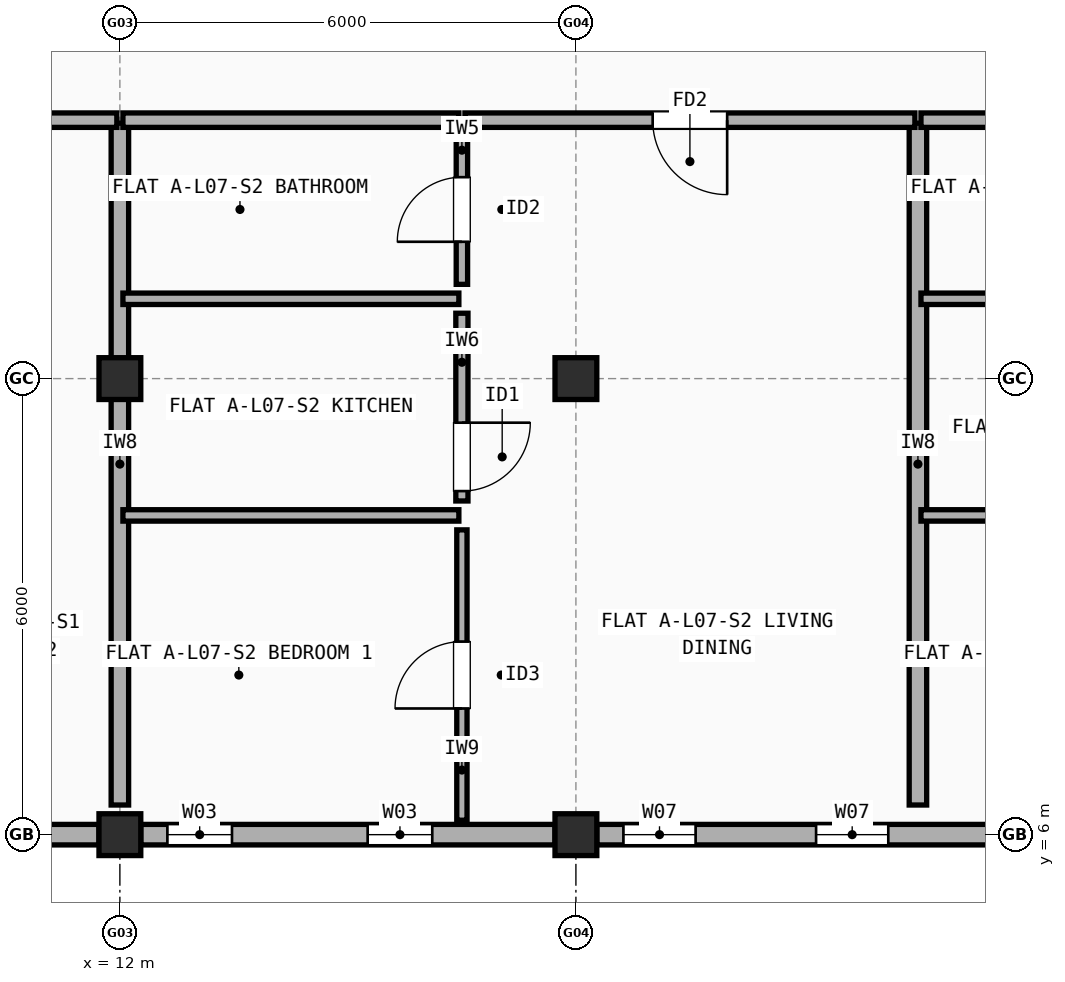
"""IFC4 building model, lengths in metres.
Left out: names, types, materials, properties, quantities, classifications, styles, units other than length and angle.
Written with IfcOpenShell. Run it as: python <this file> out.ifc"""

import sys

from ifc_helpers import new_model, si_unit, direction, frame, frame_2d, origin, origin_2d, place, context, subcontext, project, spatial, rectangle, extrude, element, fill, save


model = new_model("IFC4")
c1 = context("Model", 3, precision=1e-05, world=origin(), true_north=direction((0.0, 1.0)))
c2 = subcontext(c1, "Body", "Model", "MODEL_VIEW")
j1 = project(units=[si_unit("LENGTHUNIT", "METRE"), si_unit("PLANEANGLEUNIT", "RADIAN")], contexts=[c1])
p1 = place(None, origin())
s1 = spatial("IfcSite", under=j1, at=p1, CompositionType="ELEMENT")
p2 = place(p1, origin())
s2 = spatial("IfcBuilding", under=s1, at=p2, CompositionType="ELEMENT")
p3 = place(p2, frame((0.0, 0.0, 23.7)))
s3 = spatial("IfcBuildingStorey", under=s2, at=p3, CompositionType="ELEMENT", Elevation=23.7)
for number, where, z_axis, x_axis in (
    (1, (12.0, 6.0, 0.0), (0.0, 0.0, 1.0), (1.0, 0.0, 0.0)),
    (2, (12.0, 12.0, 0.0), (0.0, 0.0, 1.0), (1.0, 0.0, 0.0)),
    (3, (18.0, 6.0, 0.0), (0.0, 0.0, 1.0), (1.0, 0.0, 0.0)),
    (4, (18.0, 12.0, 0.0), (0.0, 0.0, 1.0), (1.0, 0.0, 0.0)),
):
    element("IfcColumn", number, at=place(p3, frame(where, z_axis=z_axis, x_axis=x_axis)), inside=s3, PredefinedType="COLUMN", context=c2, shape_type="SweptSolid", body=[
        extrude(rectangle(XDim=0.55, YDim=0.55, at=origin_2d()), origin(), (0.0, 0.0, 1.0), 2.975),
    ])
p4 = place(p3, frame((6.275, 6.0, 0.0), z_axis=(0.0, 0.0, 1.0), x_axis=(1.0, 0.0, 0.0)))
e5 = element("IfcWall", 5, at=p4, inside=s3, PredefinedType="STANDARD", context=c2, shape_type="SweptSolid", body=[
    extrude(rectangle(XDim=5.45, YDim=0.27, at=frame_2d((2.725, 0.0))), origin(), (0.0, 0.0, 1.0), 2.457),
])
p5 = place(p4, frame((0.742, 0.0, 0.9)))
e6 = element("IfcOpeningElement", 6, at=p5, cuts=e5, PredefinedType="OPENING", context=c2, shape_type="SweptSolid", body=[
    extrude(rectangle(XDim=1.2, YDim=1.35, at=frame_2d((0.6, 0.675))), frame((0.0, 0.145, 0.0), z_axis=(0.0, -1.0, 0.0), x_axis=(1.0, 0.0, 0.0)), (0.0, 0.0, 1.0), 0.29),
])
p6 = place(p4, frame((3.708, 0.0, 0.9)))
e7 = element("IfcOpeningElement", 7, at=p6, cuts=e5, PredefinedType="OPENING", context=c2, shape_type="SweptSolid", body=[
    extrude(rectangle(XDim=0.8, YDim=1.2, at=frame_2d((0.4, 0.6))), frame((0.0, 0.145, 0.0), z_axis=(0.0, -1.0, 0.0), x_axis=(1.0, 0.0, 0.0)), (0.0, 0.0, 1.0), 0.29),
])
p7 = place(p3, frame((12.275, 6.0, 0.0), z_axis=(0.0, 0.0, 1.0), x_axis=(1.0, 0.0, 0.0)))
e8 = element("IfcWall", 8, at=p7, inside=s3, PredefinedType="STANDARD", context=c2, shape_type="SweptSolid", body=[
    extrude(rectangle(XDim=5.45, YDim=0.27, at=frame_2d((2.725, 0.0))), origin(), (0.0, 0.0, 1.0), 2.457),
])
p8 = place(p7, frame((0.35, 0.0, 0.9)))
e9 = element("IfcOpeningElement", 9, at=p8, cuts=e8, PredefinedType="OPENING", context=c2, shape_type="SweptSolid", body=[
    extrude(rectangle(XDim=0.85, YDim=1.25, at=frame_2d((0.425, 0.625))), frame((0.0, 0.145, 0.0), z_axis=(0.0, -1.0, 0.0), x_axis=(1.0, 0.0, 0.0)), (0.0, 0.0, 1.0), 0.29),
])
p9 = place(p7, frame((2.985, 0.0, 0.9)))
e10 = element("IfcOpeningElement", 10, at=p9, cuts=e8, PredefinedType="OPENING", context=c2, shape_type="SweptSolid", body=[
    extrude(rectangle(XDim=0.85, YDim=1.25, at=frame_2d((0.425, 0.625))), frame((0.0, 0.145, 0.0), z_axis=(0.0, -1.0, 0.0), x_axis=(1.0, 0.0, 0.0)), (0.0, 0.0, 1.0), 0.29),
])
p10 = place(p3, frame((18.275, 6.0, 0.0), z_axis=(0.0, 0.0, 1.0), x_axis=(1.0, 0.0, 0.0)))
e11 = element("IfcWall", 11, at=p10, inside=s3, PredefinedType="STANDARD", context=c2, shape_type="SweptSolid", body=[
    extrude(rectangle(XDim=5.45, YDim=0.27, at=frame_2d((2.725, 0.0))), origin(), (0.0, 0.0, 1.0), 2.457),
])
p11 = place(p10, frame((0.35, 0.0, 0.9)))
e12 = element("IfcOpeningElement", 12, at=p11, cuts=e11, PredefinedType="OPENING", context=c2, shape_type="SweptSolid", body=[
    extrude(rectangle(XDim=0.95, YDim=1.35, at=frame_2d((0.475, 0.675))), frame((0.0, 0.145, 0.0), z_axis=(0.0, -1.0, 0.0), x_axis=(1.0, 0.0, 0.0)), (0.0, 0.0, 1.0), 0.29),
])
p12 = place(p10, frame((2.885, 0.0, 0.9)))
e13 = element("IfcOpeningElement", 13, at=p12, cuts=e11, PredefinedType="OPENING", context=c2, shape_type="SweptSolid", body=[
    extrude(rectangle(XDim=0.95, YDim=1.35, at=frame_2d((0.475, 0.675))), frame((0.0, 0.145, 0.0), z_axis=(0.0, -1.0, 0.0), x_axis=(1.0, 0.0, 0.0)), (0.0, 0.0, 1.0), 0.29),
])
p13 = place(p3, frame((12.0, 6.39, 0.0), z_axis=(0.0, 0.0, 1.0), x_axis=(0.0, 1.0, 0.0)))
e14 = element("IfcWall", 14, at=p13, inside=s3, PredefinedType="SOLIDWALL", context=c2, shape_type="SweptSolid", body=[
    extrude(rectangle(XDim=8.97, YDim=0.23, at=frame_2d((4.485, 0.0))), origin(), (0.0, 0.0, 1.0), 2.458),
])
p14 = place(p3, frame((9.04, 15.4, 0.0), z_axis=(0.0, 0.0, 1.0), x_axis=(1.0, 0.0, 0.0)))
e15 = element("IfcWall", 15, at=p14, inside=s3, PredefinedType="SOLIDWALL", context=c2, shape_type="SweptSolid", body=[
    extrude(rectangle(XDim=2.92, YDim=0.19, at=frame_2d((1.46, 0.0))), origin(), (0.0, 0.0, 1.0), 2.458),
])
p15 = place(p3, frame((22.5, 6.39, 0.0), z_axis=(0.0, 0.0, 1.0), x_axis=(0.0, 1.0, 0.0)))
e16 = element("IfcWall", 16, at=p15, inside=s3, PredefinedType="SOLIDWALL", context=c2, shape_type="SweptSolid", body=[
    extrude(rectangle(XDim=8.97, YDim=0.23, at=frame_2d((4.485, 0.0))), origin(), (0.0, 0.0, 1.0), 2.408),
])
p16 = place(p3, frame((12.04, 15.4, 0.0), z_axis=(0.0, 0.0, 1.0), x_axis=(1.0, 0.0, 0.0)))
e17 = element("IfcWall", 17, at=p16, inside=s3, PredefinedType="SOLIDWALL", context=c2, shape_type="SweptSolid", body=[
    extrude(rectangle(XDim=4.42, YDim=0.19, at=frame_2d((2.21, 0.0))), origin(), (0.0, 0.0, 1.0), 2.458),
])
p17 = place(p3, frame((16.54, 15.4, 0.0), z_axis=(0.0, 0.0, 1.0), x_axis=(1.0, 0.0, 0.0)))
e18 = element("IfcWall", 18, at=p17, inside=s3, PredefinedType="SOLIDWALL", context=c2, shape_type="SweptSolid", body=[
    extrude(rectangle(XDim=5.92, YDim=0.19, at=frame_2d((2.96, 0.0))), origin(), (0.0, 0.0, 1.0), 2.548),
])
p18 = place(p17, frame((2.47, 0.0, 0.0)))
e19 = element("IfcOpeningElement", 19, at=p18, cuts=e18, PredefinedType="OPENING", context=c2, shape_type="SweptSolid", body=[
    extrude(rectangle(XDim=0.98, YDim=2.15, at=frame_2d((0.49, 1.075))), frame((0.0, 0.105, 0.0), z_axis=(0.0, -1.0, 0.0), x_axis=(1.0, 0.0, 0.0)), (0.0, 0.0, 1.0), 0.21),
])
p19 = place(p3, frame((16.5, 6.19, 0.0), z_axis=(0.0, 0.0, 1.0), x_axis=(0.0, 1.0, 0.0)))
e20 = element("IfcWall", 20, at=p19, inside=s3, PredefinedType="PARTITIONING", context=c2, shape_type="SweptSolid", body=[
    extrude(rectangle(XDim=3.82, YDim=0.135, at=frame_2d((1.91, 0.0))), origin(), (0.0, 0.0, 1.0), 2.975),
])
p20 = place(p19, frame((1.47, 0.0, 0.0)))
e21 = element("IfcOpeningElement", 21, at=p20, cuts=e20, PredefinedType="OPENING", context=c2, shape_type="SweptSolid", body=[
    extrude(rectangle(XDim=0.88, YDim=2.1, at=frame_2d((0.44, 1.05))), frame((0.0, 0.077, 0.0), z_axis=(0.0, -1.0, 0.0), x_axis=(1.0, 0.0, 0.0)), (0.0, 0.0, 1.0), 0.155),
])
p21 = place(p3, frame((16.5, 10.39, 0.0), z_axis=(0.0, 0.0, 1.0), x_axis=(0.0, 1.0, 0.0)))
e22 = element("IfcWall", 22, at=p21, inside=s3, PredefinedType="PLUMBINGWALL", context=c2, shape_type="SweptSolid", body=[
    extrude(rectangle(XDim=2.47, YDim=0.16, at=frame_2d((1.235, 0.0))), origin(), (0.0, 0.0, 1.0), 2.508),
])
p22 = place(p21, frame((0.13, 0.0, 0.0)))
e23 = element("IfcOpeningElement", 23, at=p22, cuts=e22, PredefinedType="OPENING", context=c2, shape_type="SweptSolid", body=[
    extrude(rectangle(XDim=0.9, YDim=2.1, at=frame_2d((0.45, 1.05))), frame((0.0, 0.09, 0.0), z_axis=(0.0, -1.0, 0.0), x_axis=(1.0, 0.0, 0.0)), (0.0, 0.0, 1.0), 0.18),
])
p23 = place(p3, frame((16.5, 13.24, 0.0), z_axis=(0.0, 0.0, 1.0), x_axis=(0.0, 1.0, 0.0)))
e24 = element("IfcWall", 24, at=p23, inside=s3, PredefinedType="PARTITIONING", context=c2, shape_type="SweptSolid", body=[
    extrude(rectangle(XDim=1.97, YDim=0.15, at=frame_2d((0.985, 0.0))), origin(), (0.0, 0.0, 1.0), 2.975),
])
p24 = place(p23, frame((0.56, 0.0, 0.0)))
e25 = element("IfcOpeningElement", 25, at=p24, cuts=e24, PredefinedType="OPENING", context=c2, shape_type="SweptSolid", body=[
    extrude(rectangle(XDim=0.85, YDim=2.1, at=frame_2d((0.425, 1.05))), frame((0.0, 0.085, 0.0), z_axis=(0.0, -1.0, 0.0), x_axis=(1.0, 0.0, 0.0)), (0.0, 0.0, 1.0), 0.17),
])
p25 = place(p3, frame((12.04, 10.2, 0.0), z_axis=(0.0, 0.0, 1.0), x_axis=(1.0, 0.0, 0.0)))
e26 = element("IfcWall", 26, at=p25, inside=s3, PredefinedType="PARTITIONING", context=c2, shape_type="SweptSolid", body=[
    extrude(rectangle(XDim=4.42, YDim=0.15, at=frame_2d((2.21, 0.0))), origin(), (0.0, 0.0, 1.0), 2.508),
])
p26 = place(p3, frame((12.04, 13.05, 0.0), z_axis=(0.0, 0.0, 1.0), x_axis=(1.0, 0.0, 0.0)))
e27 = element("IfcWall", 27, at=p26, inside=s3, PredefinedType="PARTITIONING", context=c2, shape_type="SweptSolid", body=[
    extrude(rectangle(XDim=4.42, YDim=0.15, at=frame_2d((2.21, 0.0))), origin(), (0.0, 0.0, 1.0), 2.458),
])
p27 = place(p3, frame((22.54, 15.4, 0.0), z_axis=(0.0, 0.0, 1.0), x_axis=(1.0, 0.0, 0.0)))
e28 = element("IfcWall", 28, at=p27, inside=s3, PredefinedType="SOLIDWALL", context=c2, shape_type="SweptSolid", body=[
    extrude(rectangle(XDim=4.42, YDim=0.19, at=frame_2d((2.21, 0.0))), origin(), (0.0, 0.0, 1.0), 2.548),
])
p28 = place(p3, frame((22.54, 10.2, 0.0), z_axis=(0.0, 0.0, 1.0), x_axis=(1.0, 0.0, 0.0)))
e29 = element("IfcWall", 29, at=p28, inside=s3, PredefinedType="PARTITIONING", context=c2, shape_type="SweptSolid", body=[
    extrude(rectangle(XDim=4.42, YDim=0.15, at=frame_2d((2.21, 0.0))), origin(), (0.0, 0.0, 1.0), 2.458),
])
p29 = place(p3, frame((22.54, 13.05, 0.0), z_axis=(0.0, 0.0, 1.0), x_axis=(1.0, 0.0, 0.0)))
e30 = element("IfcWall", 30, at=p29, inside=s3, PredefinedType="PARTITIONING", context=c2, shape_type="SweptSolid", body=[
    extrude(rectangle(XDim=4.42, YDim=0.15, at=frame_2d((2.21, 0.0))), origin(), (0.0, 0.0, 1.0), 2.548),
])
p30 = place(p8, origin())
e31 = element("IfcWindow", 31, at=p30, inside=s3, PartitioningType="SINGLE_PANEL", PredefinedType="WINDOW", context=c2, shape_type="SweptSolid", body=[
    extrude(rectangle(XDim=0.85, YDim=1.25, at=frame_2d((0.425, 0.625))), frame((0.0, 0.03, 0.0), z_axis=(0.0, -1.0, 0.0), x_axis=(1.0, 0.0, 0.0)), (0.0, 0.0, 1.0), 0.06),
])
fill(e9, e31)
p31 = place(p9, origin())
e32 = element("IfcWindow", 32, at=p31, inside=s3, PartitioningType="SINGLE_PANEL", PredefinedType="WINDOW", context=c2, shape_type="SweptSolid", body=[
    extrude(rectangle(XDim=0.85, YDim=1.25, at=frame_2d((0.425, 0.625))), frame((0.0, 0.03, 0.0), z_axis=(0.0, -1.0, 0.0), x_axis=(1.0, 0.0, 0.0)), (0.0, 0.0, 1.0), 0.06),
])
fill(e10, e32)
p32 = place(p11, origin())
e33 = element("IfcWindow", 33, at=p32, inside=s3, PartitioningType="SINGLE_PANEL", PredefinedType="WINDOW", context=c2, shape_type="SweptSolid", body=[
    extrude(rectangle(XDim=0.95, YDim=1.35, at=frame_2d((0.475, 0.675))), frame((0.0, 0.03, 0.0), z_axis=(0.0, -1.0, 0.0), x_axis=(1.0, 0.0, 0.0)), (0.0, 0.0, 1.0), 0.06),
])
fill(e12, e33)
p33 = place(p12, origin())
e34 = element("IfcWindow", 34, at=p33, inside=s3, PartitioningType="SINGLE_PANEL", PredefinedType="WINDOW", context=c2, shape_type="SweptSolid", body=[
    extrude(rectangle(XDim=0.95, YDim=1.35, at=frame_2d((0.475, 0.675))), frame((0.0, 0.03, 0.0), z_axis=(0.0, -1.0, 0.0), x_axis=(1.0, 0.0, 0.0)), (0.0, 0.0, 1.0), 0.06),
])
fill(e13, e34)
p34 = place(p18, origin())
e35 = element("IfcDoor", 35, at=p34, inside=s3, OperationType="SINGLE_SWING_RIGHT", PredefinedType="DOOR", context=c2, shape_type="SweptSolid", body=[
    extrude(rectangle(XDim=0.98, YDim=2.15, at=frame_2d((0.49, 1.075))), frame((0.0, 0.025, 0.0), z_axis=(0.0, -1.0, 0.0), x_axis=(1.0, 0.0, 0.0)), (0.0, 0.0, 1.0), 0.05),
])
fill(e19, e35)
p35 = place(p20, origin())
e36 = element("IfcDoor", 36, at=p35, inside=s3, OperationType="SINGLE_SWING_LEFT", PredefinedType="DOOR", context=c2, shape_type="SweptSolid", body=[
    extrude(rectangle(XDim=0.88, YDim=2.1, at=frame_2d((0.44, 1.05))), frame((0.0, 0.025, 0.0), z_axis=(0.0, -1.0, 0.0), x_axis=(1.0, 0.0, 0.0)), (0.0, 0.0, 1.0), 0.05),
])
fill(e21, e36)
p36 = place(p22, origin())
e37 = element("IfcDoor", 37, at=p36, inside=s3, OperationType="SINGLE_SWING_RIGHT", PredefinedType="DOOR", context=c2, shape_type="SweptSolid", body=[
    extrude(rectangle(XDim=0.9, YDim=2.1, at=frame_2d((0.45, 1.05))), frame((0.0, 0.025, 0.0), z_axis=(0.0, -1.0, 0.0), x_axis=(1.0, 0.0, 0.0)), (0.0, 0.0, 1.0), 0.05),
])
fill(e23, e37)
p37 = place(p24, origin())
e38 = element("IfcDoor", 38, at=p37, inside=s3, OperationType="SINGLE_SWING_LEFT", PredefinedType="DOOR", context=c2, shape_type="SweptSolid", body=[
    extrude(rectangle(XDim=0.85, YDim=2.1, at=frame_2d((0.425, 1.05))), frame((0.0, 0.025, 0.0), z_axis=(0.0, -1.0, 0.0), x_axis=(1.0, 0.0, 0.0)), (0.0, 0.0, 1.0), 0.05),
])
fill(e25, e38)
save(model, sys.argv[1])
